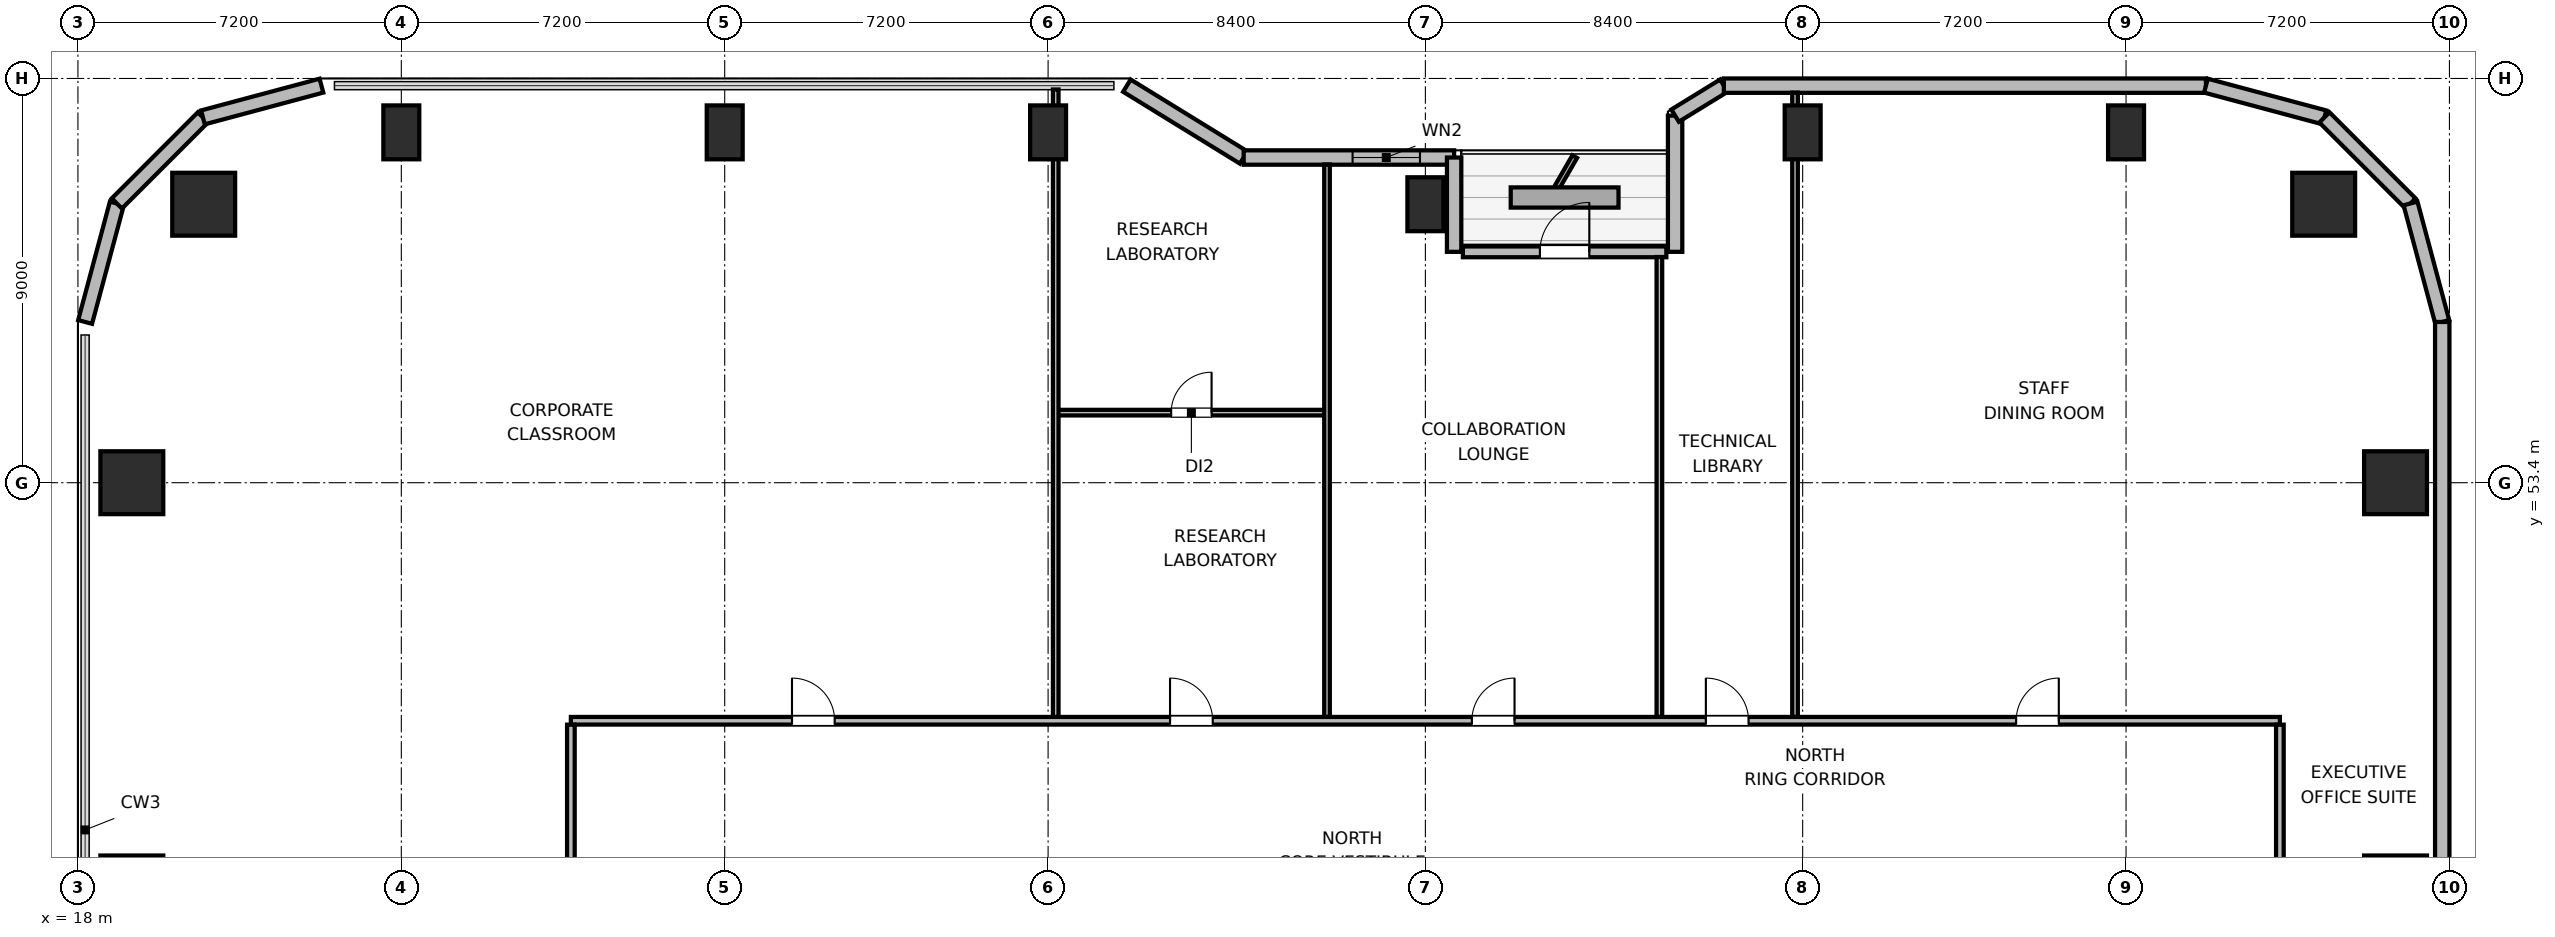
"""IFC4 building model, lengths in metres.
Left out: names, types, materials, properties, quantities, classifications, styles, units other than length and angle.
Written with IfcOpenShell. Run it as: python <this file> out.ifc"""

import sys

from ifc_helpers import new_model, si_unit, direction, frame, frame_2d, origin, origin_2d, place, context, subcontext, project, spatial, rectangle, circle, extrude, element, fill, save


model = new_model("IFC4")
c1 = context("Model", 3, precision=1e-05, world=origin(), true_north=direction((0.0, 1.0)))
c2 = subcontext(c1, "Body", "Model", "MODEL_VIEW")
j1 = project(units=[si_unit("LENGTHUNIT", "METRE"), si_unit("PLANEANGLEUNIT", "RADIAN")], contexts=[c1])
p1 = place(None, origin())
s1 = spatial("IfcSite", under=j1, at=p1, CompositionType="ELEMENT")
p2 = place(p1, origin())
s2 = spatial("IfcBuilding", under=s1, at=p2, CompositionType="ELEMENT")
p3 = place(p2, frame((0.0, 0.0, 101.4)))
s3 = spatial("IfcBuildingStorey", under=s2, at=p3, CompositionType="ELEMENT", Elevation=101.4)
for number, where, z_axis, x_axis in (
    (1, (68.0, 59.6, 0.0), (0.0, 0.0, 1.0), (1.0, 0.0, 0.0)),
    (2, (20.8, 59.6, 0.0), (0.0, 0.0, 1.0), (1.0, 0.0, 0.0)),
):
    element("IfcColumn", number, at=place(p3, frame(where, z_axis=z_axis, x_axis=x_axis)), inside=s3, PredefinedType="COLUMN", context=c2, shape_type="SweptSolid", body=[
        extrude(circle(Radius=0.7, at=origin_2d()), origin(), (0.0, 0.0, 1.0), 3.9),
    ])
for number, where, z_axis, x_axis in (
    (3, (25.2, 61.2, 0.0), (0.0, 0.0, 1.0), (1.0, 0.0, 0.0)),
    (4, (32.4, 61.2, 0.0), (0.0, 0.0, 1.0), (1.0, 0.0, 0.0)),
    (5, (39.6, 61.2, 0.0), (0.0, 0.0, 1.0), (1.0, 0.0, 0.0)),
    (6, (48.0, 59.6, 0.0), (0.0, 0.0, 1.0), (1.0, 0.0, 0.0)),
    (7, (56.4, 61.2, 0.0), (0.0, 0.0, 1.0), (1.0, 0.0, 0.0)),
    (8, (63.6, 61.2, 0.0), (0.0, 0.0, 1.0), (1.0, 0.0, 0.0)),
):
    element("IfcColumn", number, at=place(p3, frame(where, z_axis=z_axis, x_axis=x_axis)), inside=s3, PredefinedType="COLUMN", context=c2, shape_type="SweptSolid", body=[
        extrude(rectangle(XDim=0.8, YDim=1.2, at=origin_2d()), origin(), (0.0, 0.0, 1.0), 3.9),
    ])
for number, where, z_axis, x_axis in (
    (9, (19.2, 44.4, 0.0), (0.0, 0.0, 1.0), (1.0, 0.0, 0.0)),
    (10, (69.6, 44.4, 0.0), (0.0, 0.0, 1.0), (1.0, 0.0, 0.0)),
    (11, (19.2, 53.4, 0.0), (0.0, 0.0, 1.0), (1.0, 0.0, 0.0)),
    (12, (69.6, 53.4, 0.0), (0.0, 0.0, 1.0), (1.0, 0.0, 0.0)),
):
    element("IfcColumn", number, at=place(p3, frame(where, z_axis=z_axis, x_axis=x_axis)), inside=s3, PredefinedType="COLUMN", context=c2, shape_type="SweptSolid", body=[
        extrude(rectangle(XDim=1.4, YDim=1.4, at=origin_2d()), origin(), (0.0, 0.0, 1.0), 3.9),
    ])
p4 = place(p3, frame((18.16, 56.979, 0.0), z_axis=(0.0, 0.0, 1.0), x_axis=(0.25869736047, 0.965958423373, 0.0)))
e13 = element("IfcWall", 13, at=p4, inside=s3, PredefinedType="SOLIDWALL", context=c2, shape_type="SweptSolid", body=[
    extrude(rectangle(XDim=2.731, YDim=0.32, at=frame_2d((1.366, 0.0))), origin(), (0.0, 0.0, 1.0), 3.64),
])
p5 = place(p3, frame((18.866, 59.617, 0.0), z_axis=(0.0, 0.0, 1.0), x_axis=(0.707106781187, 0.707106781187, 0.0)))
e14 = element("IfcWall", 14, at=p5, inside=s3, PredefinedType="SOLIDWALL", context=c2, shape_type="SweptSolid", body=[
    extrude(rectangle(XDim=2.71, YDim=0.32, at=frame_2d((1.355, 0.0))), origin(), (0.0, 0.0, 1.0), 3.64),
])
p6 = place(p3, frame((20.783, 61.533, 0.0), z_axis=(0.0, 0.0, 1.0), x_axis=(0.965964405026, 0.25867502435, 0.0)))
e15 = element("IfcWall", 15, at=p6, inside=s3, PredefinedType="SOLIDWALL", context=c2, shape_type="SweptSolid", body=[
    extrude(rectangle(XDim=2.731, YDim=0.32, at=frame_2d((1.366, 0.0))), origin(), (0.0, 0.0, 1.0), 3.64),
])
p7 = place(p3, frame((41.355, 62.24, 0.0), z_axis=(0.0, 0.0, 1.0), x_axis=(0.851630857047, -0.524142044989, 0.0)))
e16 = element("IfcWall", 16, at=p7, inside=s3, PredefinedType="SOLIDWALL", context=c2, shape_type="SweptSolid", body=[
    extrude(rectangle(XDim=3.053, YDim=0.32, at=frame_2d((1.526, 0.0))), origin(), (0.0, 0.0, 1.0), 2.875),
])
p8 = place(p3, frame((43.955, 60.64, 0.0), z_axis=(0.0, 0.0, 1.0), x_axis=(1.0, 0.0, 0.0)))
e17 = element("IfcWall", 17, at=p8, inside=s3, PredefinedType="SOLIDWALL", context=c2, shape_type="SweptSolid", body=[
    extrude(rectangle(XDim=4.685, YDim=0.32, at=frame_2d((2.343, 0.0))), origin(), (0.0, 0.0, 1.0), 2.875),
])
p9 = place(p8, frame((2.425, 0.0, 0.85)))
e18 = element("IfcOpeningElement", 18, at=p9, cuts=e17, PredefinedType="OPENING", context=c2, shape_type="SweptSolid", body=[
    extrude(rectangle(XDim=1.5, YDim=1.1, at=frame_2d((0.75, 0.55))), frame((0.0, 0.17, 0.0), z_axis=(0.0, -1.0, 0.0), x_axis=(1.0, 0.0, 0.0)), (0.0, 0.0, 1.0), 0.34),
])
p10 = place(p3, frame((48.64, 60.64, 0.0), z_axis=(0.0, 0.0, 1.0), x_axis=(0.0, -1.0, 0.0)))
e19 = element("IfcWall", 19, at=p10, inside=s3, PredefinedType="SOLIDWALL", context=c2, shape_type="SweptSolid", body=[
    extrude(rectangle(XDim=2.1, YDim=0.32, at=frame_2d((1.05, 0.0))), origin(), (0.0, 0.0, 1.0), 2.875),
])
p11 = place(p3, frame((48.835, 58.54, 0.0), z_axis=(0.0, 0.0, 1.0), x_axis=(1.0, 0.0, 0.0)))
e20 = element("IfcWall", 20, at=p11, inside=s3, PredefinedType="SOLIDWALL", context=c2, shape_type="SweptSolid", body=[
    extrude(rectangle(XDim=4.53, YDim=0.24, at=frame_2d((2.265, 0.0))), origin(), (0.0, 0.0, 1.0), 3.64),
])
p12 = place(p11, frame((1.715, 0.0, 0.0)))
e21 = element("IfcOpeningElement", 21, at=p12, cuts=e20, PredefinedType="OPENING", context=c2, shape_type="SweptSolid", body=[
    extrude(rectangle(XDim=1.1, YDim=2.04, at=frame_2d((0.55, 1.02))), frame((0.0, 0.13, 0.0), z_axis=(0.0, -1.0, 0.0), x_axis=(1.0, 0.0, 0.0)), (0.0, 0.0, 1.0), 0.26),
])
p13 = place(p3, frame((53.56, 58.54, 0.0), z_axis=(0.0, 0.0, 1.0), x_axis=(0.0, 1.0, 0.0)))
e22 = element("IfcWall", 22, at=p13, inside=s3, PredefinedType="SOLIDWALL", context=c2, shape_type="SweptSolid", body=[
    extrude(rectangle(XDim=3.032, YDim=0.32, at=frame_2d((1.516, 0.0))), origin(), (0.0, 0.0, 1.0), 2.875),
])
p14 = place(p3, frame((53.56, 61.573, 0.0), z_axis=(0.0, 0.0, 1.0), x_axis=(0.851776724646, 0.523904964045, 0.0)))
e23 = element("IfcWall", 23, at=p14, inside=s3, PredefinedType="SOLIDWALL", context=c2, shape_type="SweptSolid", body=[
    extrude(rectangle(XDim=1.274, YDim=0.32, at=frame_2d((0.637, 0.0))), origin(), (0.0, 0.0, 1.0), 3.64),
])
p15 = place(p3, frame((54.645, 62.24, 0.0), z_axis=(0.0, 0.0, 1.0), x_axis=(1.0, 0.0, 0.0)))
e24 = element("IfcWall", 24, at=p15, inside=s3, PredefinedType="SOLIDWALL", context=c2, shape_type="SweptSolid", body=[
    extrude(rectangle(XDim=10.734, YDim=0.32, at=frame_2d((5.367, 0.0))), origin(), (0.0, 0.0, 1.0), 3.64),
])
p16 = place(p3, frame((65.379, 62.24, 0.0), z_axis=(0.0, 0.0, 1.0), x_axis=(0.965958423373, -0.25869736047, 0.0)))
e25 = element("IfcWall", 25, at=p16, inside=s3, PredefinedType="SOLIDWALL", context=c2, shape_type="SweptSolid", body=[
    extrude(rectangle(XDim=2.731, YDim=0.32, at=frame_2d((1.366, 0.0))), origin(), (0.0, 0.0, 1.0), 3.64),
])
p17 = place(p3, frame((68.017, 61.533, 0.0), z_axis=(0.0, 0.0, 1.0), x_axis=(0.707151821269, -0.707061738235, 0.0)))
e26 = element("IfcWall", 26, at=p17, inside=s3, PredefinedType="SOLIDWALL", context=c2, shape_type="SweptSolid", body=[
    extrude(rectangle(XDim=2.71, YDim=0.32, at=frame_2d((1.355, 0.0))), origin(), (0.0, 0.0, 1.0), 3.64),
])
p18 = place(p3, frame((69.934, 59.617, 0.0), z_axis=(0.0, 0.0, 1.0), x_axis=(0.258613949072, -0.965980758269, 0.0)))
e27 = element("IfcWall", 27, at=p18, inside=s3, PredefinedType="SOLIDWALL", context=c2, shape_type="SweptSolid", body=[
    extrude(rectangle(XDim=2.731, YDim=0.32, at=frame_2d((1.366, 0.0))), origin(), (0.0, 0.0, 1.0), 3.64),
])
p19 = place(p3, frame((70.64, 56.979, 0.0), z_axis=(0.0, 0.0, 1.0), x_axis=(0.0, -1.0, 0.0)))
e28 = element("IfcWall", 28, at=p19, inside=s3, PredefinedType="SOLIDWALL", context=c2, shape_type="SweptSolid", body=[
    extrude(rectangle(XDim=14.219, YDim=0.32, at=frame_2d((7.109, 0.0))), origin(), (0.0, 0.0, 1.0), 3.64),
])
p20 = place(p3, frame((28.975, 48.1, 0.0), z_axis=(0.0, 0.0, 1.0), x_axis=(1.0, 0.0, 0.0)))
e29 = element("IfcWall", 29, at=p20, inside=s3, PredefinedType="PARTITIONING", context=c2, shape_type="SweptSolid", body=[
    extrude(rectangle(XDim=38.05, YDim=0.17, at=frame_2d((19.025, 0.0))), origin(), (0.0, 0.0, 1.0), 3.64),
])
p21 = place(p20, frame((4.923, 0.0, 0.0)))
e30 = element("IfcOpeningElement", 30, at=p21, cuts=e29, PredefinedType="OPENING", context=c2, shape_type="SweptSolid", body=[
    extrude(rectangle(XDim=0.95, YDim=2.04, at=frame_2d((0.475, 1.02))), frame((0.0, 0.095, 0.0), z_axis=(0.0, -1.0, 0.0), x_axis=(1.0, 0.0, 0.0)), (0.0, 0.0, 1.0), 0.19),
])
p22 = place(p20, frame((13.34, 0.0, 0.0)))
e31 = element("IfcOpeningElement", 31, at=p22, cuts=e29, PredefinedType="OPENING", context=c2, shape_type="SweptSolid", body=[
    extrude(rectangle(XDim=0.95, YDim=2.04, at=frame_2d((0.475, 1.02))), frame((0.0, 0.095, 0.0), z_axis=(0.0, -1.0, 0.0), x_axis=(1.0, 0.0, 0.0)), (0.0, 0.0, 1.0), 0.19),
])
p23 = place(p20, frame((20.06, 0.0, 0.0)))
e32 = element("IfcOpeningElement", 32, at=p23, cuts=e29, PredefinedType="OPENING", context=c2, shape_type="SweptSolid", body=[
    extrude(rectangle(XDim=0.95, YDim=2.04, at=frame_2d((0.475, 1.02))), frame((0.0, 0.095, 0.0), z_axis=(0.0, -1.0, 0.0), x_axis=(1.0, 0.0, 0.0)), (0.0, 0.0, 1.0), 0.19),
])
p24 = place(p20, frame((25.27, 0.0, 0.0)))
e33 = element("IfcOpeningElement", 33, at=p24, cuts=e29, PredefinedType="OPENING", context=c2, shape_type="SweptSolid", body=[
    extrude(rectangle(XDim=0.95, YDim=2.04, at=frame_2d((0.475, 1.02))), frame((0.0, 0.095, 0.0), z_axis=(0.0, -1.0, 0.0), x_axis=(1.0, 0.0, 0.0)), (0.0, 0.0, 1.0), 0.19),
])
p25 = place(p20, frame((32.178, 0.0, 0.0)))
e34 = element("IfcOpeningElement", 34, at=p25, cuts=e29, PredefinedType="OPENING", context=c2, shape_type="SweptSolid", body=[
    extrude(rectangle(XDim=0.95, YDim=2.04, at=frame_2d((0.475, 1.02))), frame((0.0, 0.095, 0.0), z_axis=(0.0, -1.0, 0.0), x_axis=(1.0, 0.0, 0.0)), (0.0, 0.0, 1.0), 0.19),
])
p26 = place(p3, frame((28.975, 23.987, 0.0), z_axis=(0.0, 0.0, 1.0), x_axis=(0.0, 1.0, 0.0)))
e35 = element("IfcWall", 35, at=p26, inside=s3, PredefinedType="PARTITIONING", context=c2, shape_type="SweptSolid", body=[
    extrude(rectangle(XDim=24.026, YDim=0.17, at=frame_2d((12.013, 0.0))), origin(), (0.0, 0.0, 1.0), 3.64),
])
p27 = place(p26, frame((11.538, 0.0, 0.0)))
e36 = element("IfcOpeningElement", 36, at=p27, cuts=e35, PredefinedType="OPENING", context=c2, shape_type="SweptSolid", body=[
    extrude(rectangle(XDim=0.95, YDim=2.04, at=frame_2d((0.475, 1.02))), frame((0.0, 0.095, 0.0), z_axis=(0.0, -1.0, 0.0), x_axis=(1.0, 0.0, 0.0)), (0.0, 0.0, 1.0), 0.19),
])
p28 = place(p3, frame((67.025, 23.987, 0.0), z_axis=(0.0, 0.0, 1.0), x_axis=(0.0, 1.0, 0.0)))
e37 = element("IfcWall", 37, at=p28, inside=s3, PredefinedType="PARTITIONING", context=c2, shape_type="SweptSolid", body=[
    extrude(rectangle(XDim=24.026, YDim=0.17, at=frame_2d((12.013, 0.0))), origin(), (0.0, 0.0, 1.0), 3.64),
])
p29 = place(p28, frame((6.088, 0.0, 0.0)))
e38 = element("IfcOpeningElement", 38, at=p29, cuts=e37, PredefinedType="OPENING", context=c2, shape_type="SweptSolid", body=[
    extrude(rectangle(XDim=0.95, YDim=2.04, at=frame_2d((0.475, 1.02))), frame((0.0, 0.095, 0.0), z_axis=(0.0, -1.0, 0.0), x_axis=(1.0, 0.0, 0.0)), (0.0, 0.0, 1.0), 0.19),
])
p30 = place(p28, frame((18.188, 0.0, 0.0)))
e39 = element("IfcOpeningElement", 39, at=p30, cuts=e37, PredefinedType="OPENING", context=c2, shape_type="SweptSolid", body=[
    extrude(rectangle(XDim=0.95, YDim=2.04, at=frame_2d((0.475, 1.02))), frame((0.0, 0.095, 0.0), z_axis=(0.0, -1.0, 0.0), x_axis=(1.0, 0.0, 0.0)), (0.0, 0.0, 1.0), 0.19),
])
p31 = place(p3, frame((39.77, 54.96, 0.0), z_axis=(0.0, 0.0, 1.0), x_axis=(1.0, 0.0, 0.0)))
e40 = element("IfcWall", 40, at=p31, inside=s3, PredefinedType="PARTITIONING", context=c2, shape_type="SweptSolid", body=[
    extrude(rectangle(XDim=6.04, YDim=0.125, at=frame_2d((3.02, 0.0))), origin(), (0.0, 0.0, 1.0), 3.64),
])
p32 = place(p31, frame((2.57, 0.0, 0.0)))
e41 = element("IfcOpeningElement", 41, at=p32, cuts=e40, PredefinedType="OPENING", context=c2, shape_type="SweptSolid", body=[
    extrude(rectangle(XDim=0.9, YDim=2.02, at=frame_2d((0.45, 1.01))), frame((0.0, 0.073, 0.0), z_axis=(0.0, -1.0, 0.0), x_axis=(1.0, 0.0, 0.0)), (0.0, 0.0, 1.0), 0.145),
])
p33 = place(p3, frame((39.77, 48.187, 0.0), z_axis=(0.0, 0.0, 1.0), x_axis=(0.0, 1.0, 0.0)))
e42 = element("IfcWall", 42, at=p33, inside=s3, PredefinedType="PARTITIONING", context=c2, shape_type="SweptSolid", body=[
    extrude(rectangle(XDim=13.968, YDim=0.125, at=frame_2d((6.984, 0.0))), origin(), (0.0, 0.0, 1.0), 3.003),
])
p34 = place(p3, frame((45.81, 48.187, 0.0), z_axis=(0.0, 0.0, 1.0), x_axis=(0.0, 1.0, 0.0)))
e43 = element("IfcWall", 43, at=p34, inside=s3, PredefinedType="PARTITIONING", context=c2, shape_type="SweptSolid", body=[
    extrude(rectangle(XDim=12.298, YDim=0.125, at=frame_2d((6.149, 0.0))), origin(), (0.0, 0.0, 1.0), 3.64),
])
p35 = place(p3, frame((53.21, 48.187, 0.0), z_axis=(0.0, 0.0, 1.0), x_axis=(0.0, 1.0, 0.0)))
e44 = element("IfcWall", 44, at=p35, inside=s3, PredefinedType="PARTITIONING", context=c2, shape_type="SweptSolid", body=[
    extrude(rectangle(XDim=10.238, YDim=0.125, at=frame_2d((5.119, 0.0))), origin(), (0.0, 0.0, 1.0), 3.003),
])
p36 = place(p3, frame((56.23, 48.187, 0.0), z_axis=(0.0, 0.0, 1.0), x_axis=(0.0, 1.0, 0.0)))
e45 = element("IfcWall", 45, at=p36, inside=s3, PredefinedType="PARTITIONING", context=c2, shape_type="SweptSolid", body=[
    extrude(rectangle(XDim=13.898, YDim=0.125, at=frame_2d((6.949, 0.0))), origin(), (0.0, 0.0, 1.0), 3.003),
])
p37 = place(p9, origin())
e46 = element("IfcWindow", 46, at=p37, inside=s3, PartitioningType="SINGLE_PANEL", PredefinedType="WINDOW", context=c2, shape_type="SweptSolid", body=[
    extrude(rectangle(XDim=1.5, YDim=1.1, at=frame_2d((0.75, 0.55))), frame((0.0, 0.03, 0.0), z_axis=(0.0, -1.0, 0.0), x_axis=(1.0, 0.0, 0.0)), (0.0, 0.0, 1.0), 0.06),
])
fill(e18, e46)
p38 = place(p12, origin())
e47 = element("IfcDoor", 47, at=p38, inside=s3, OperationType="SINGLE_SWING_RIGHT", PredefinedType="DOOR", context=c2, shape_type="SweptSolid", body=[
    extrude(rectangle(XDim=1.1, YDim=2.04, at=frame_2d((0.55, 1.02))), frame((0.0, 0.025, 0.0), z_axis=(0.0, -1.0, 0.0), x_axis=(1.0, 0.0, 0.0)), (0.0, 0.0, 1.0), 0.05),
])
fill(e21, e47)
p39 = place(p21, origin())
e48 = element("IfcDoor", 48, at=p39, inside=s3, OperationType="SINGLE_SWING_LEFT", PredefinedType="DOOR", context=c2, shape_type="SweptSolid", body=[
    extrude(rectangle(XDim=0.95, YDim=2.04, at=frame_2d((0.475, 1.02))), frame((0.0, 0.025, 0.0), z_axis=(0.0, -1.0, 0.0), x_axis=(1.0, 0.0, 0.0)), (0.0, 0.0, 1.0), 0.05),
])
fill(e30, e48)
p40 = place(p32, origin())
e49 = element("IfcDoor", 49, at=p40, inside=s3, OperationType="SINGLE_SWING_RIGHT", PredefinedType="DOOR", context=c2, shape_type="SweptSolid", body=[
    extrude(rectangle(XDim=0.9, YDim=2.02, at=frame_2d((0.45, 1.01))), frame((0.0, 0.025, 0.0), z_axis=(0.0, -1.0, 0.0), x_axis=(1.0, 0.0, 0.0)), (0.0, 0.0, 1.0), 0.05),
])
fill(e41, e49)
p41 = place(p22, origin())
e50 = element("IfcDoor", 50, at=p41, inside=s3, OperationType="SINGLE_SWING_LEFT", PredefinedType="DOOR", context=c2, shape_type="SweptSolid", body=[
    extrude(rectangle(XDim=0.95, YDim=2.04, at=frame_2d((0.475, 1.02))), frame((0.0, 0.025, 0.0), z_axis=(0.0, -1.0, 0.0), x_axis=(1.0, 0.0, 0.0)), (0.0, 0.0, 1.0), 0.05),
])
fill(e31, e50)
p42 = place(p23, origin())
e51 = element("IfcDoor", 51, at=p42, inside=s3, OperationType="SINGLE_SWING_RIGHT", PredefinedType="DOOR", context=c2, shape_type="SweptSolid", body=[
    extrude(rectangle(XDim=0.95, YDim=2.04, at=frame_2d((0.475, 1.02))), frame((0.0, 0.025, 0.0), z_axis=(0.0, -1.0, 0.0), x_axis=(1.0, 0.0, 0.0)), (0.0, 0.0, 1.0), 0.05),
])
fill(e32, e51)
p43 = place(p24, origin())
e52 = element("IfcDoor", 52, at=p43, inside=s3, OperationType="SINGLE_SWING_LEFT", PredefinedType="DOOR", context=c2, shape_type="SweptSolid", body=[
    extrude(rectangle(XDim=0.95, YDim=2.04, at=frame_2d((0.475, 1.02))), frame((0.0, 0.025, 0.0), z_axis=(0.0, -1.0, 0.0), x_axis=(1.0, 0.0, 0.0)), (0.0, 0.0, 1.0), 0.05),
])
fill(e33, e52)
p44 = place(p25, origin())
e53 = element("IfcDoor", 53, at=p44, inside=s3, OperationType="SINGLE_SWING_RIGHT", PredefinedType="DOOR", context=c2, shape_type="SweptSolid", body=[
    extrude(rectangle(XDim=0.95, YDim=2.04, at=frame_2d((0.475, 1.02))), frame((0.0, 0.025, 0.0), z_axis=(0.0, -1.0, 0.0), x_axis=(1.0, 0.0, 0.0)), (0.0, 0.0, 1.0), 0.05),
])
fill(e34, e53)
save(model, sys.argv[1])
